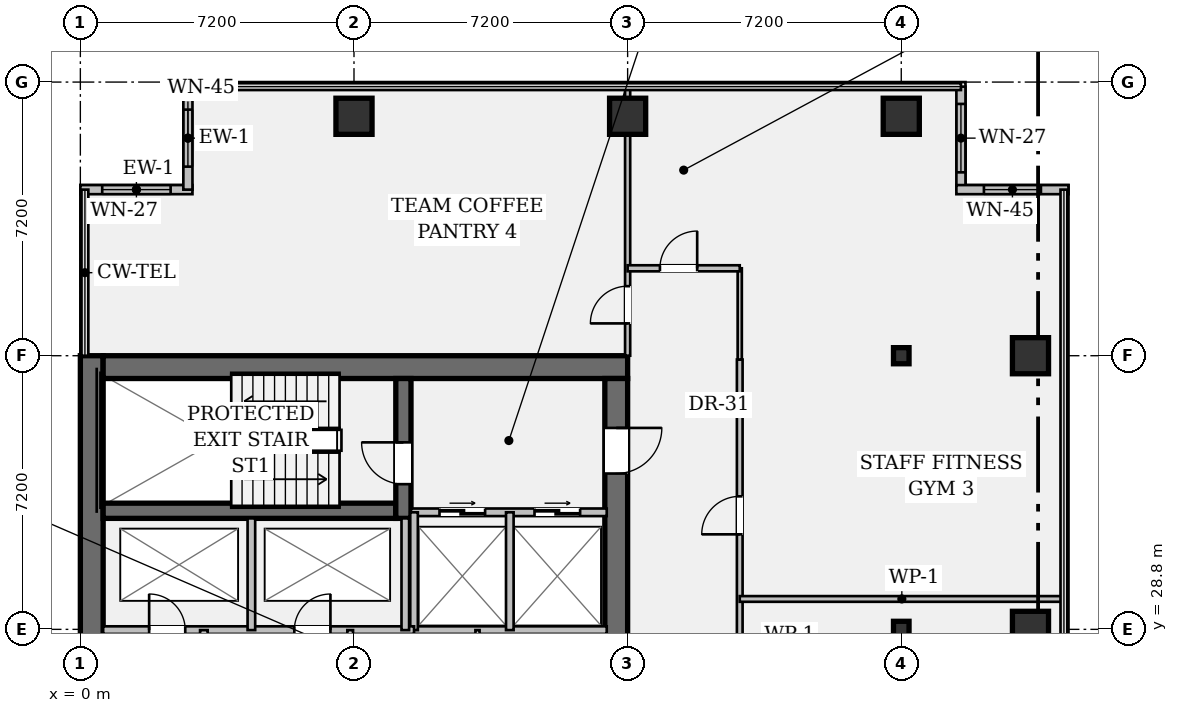
"""IFC4 building model, lengths in metres.
Left out: names, types, materials, properties, quantities, classifications, styles, units other than length and angle.
Written with IfcOpenShell. Run it as: python <this file> out.ifc"""

import sys

from ifc_helpers import new_model, si_unit, direction, frame, frame_2d, origin, origin_2d, place, context, subcontext, project, spatial, rectangle, hollow_rectangle, i_section, extrude, element, fill, save


model = new_model("IFC4")
c1 = context("Model", 3, precision=1e-05, world=origin(), true_north=direction((0.0, 1.0)))
c2 = subcontext(c1, "Body", "Model", "MODEL_VIEW")
j1 = project(units=[si_unit("LENGTHUNIT", "METRE"), si_unit("PLANEANGLEUNIT", "RADIAN")], contexts=[c1])
p1 = place(None, origin())
s1 = spatial("IfcSite", under=j1, at=p1, CompositionType="ELEMENT")
p2 = place(p1, origin())
s2 = spatial("IfcBuilding", under=s1, at=p2, CompositionType="ELEMENT")
p3 = place(p2, frame((0.0, 0.0, 113.75)))
s3 = spatial("IfcBuildingStorey", under=s2, at=p3, CompositionType="ELEMENT", Elevation=113.75)
p4 = place(p3, frame((0.3, 7.2, 0.0), z_axis=(0.0, 0.0, 1.0), x_axis=(0.0, 1.0, 0.0)))
e1 = element("IfcWall", 1, at=p4, inside=s3, PredefinedType="SHEAR", context=c2, shape_type="SweptSolid", body=[
    extrude(rectangle(XDim=28.8, YDim=0.6, at=frame_2d((14.4, 0.0))), origin(), (0.0, 0.0, 1.0), 3.58),
])
p5 = place(p3, frame((0.6, 35.7, 0.0), z_axis=(0.0, 0.0, 1.0), x_axis=(1.0, 0.0, 0.0)))
e2 = element("IfcWall", 2, at=p5, inside=s3, PredefinedType="SHEAR", context=c2, shape_type="SweptSolid", body=[
    extrude(rectangle(XDim=13.8, YDim=0.6, at=frame_2d((6.9, 0.0))), origin(), (0.0, 0.0, 1.0), 3.58),
])
p6 = place(p3, frame((14.1, 35.4, 0.0), z_axis=(0.0, 0.0, 1.0), x_axis=(0.0, -1.0, 0.0)))
e3 = element("IfcWall", 3, at=p6, inside=s3, PredefinedType="SHEAR", context=c2, shape_type="SweptSolid", body=[
    extrude(rectangle(XDim=27.6, YDim=0.6, at=frame_2d((13.8, 0.0))), origin(), (0.0, 0.0, 1.0), 3.58),
])
p7 = place(p6, frame((1.3, 0.0, 0.0)))
e4 = element("IfcOpeningElement", 4, at=p7, cuts=e3, PredefinedType="OPENING", context=c2, shape_type="SweptSolid", body=[
    extrude(rectangle(XDim=1.2, YDim=2.15, at=frame_2d((0.6, 1.075))), frame((0.0, 0.312, 0.0), z_axis=(0.0, -1.0, 0.0), x_axis=(1.0, 0.0, 0.0)), (0.0, 0.0, 1.0), 0.624),
])
p8 = place(p6, frame((25.25, 0.0, 0.0)))
e5 = element("IfcOpeningElement", 5, at=p8, cuts=e3, PredefinedType="OPENING", context=c2, shape_type="SweptSolid", body=[
    extrude(rectangle(XDim=1.2, YDim=2.15, at=frame_2d((0.6, 1.075))), frame((0.0, 0.312, 0.0), z_axis=(0.0, -1.0, 0.0), x_axis=(1.0, 0.0, 0.0)), (0.0, 0.0, 1.0), 0.624),
])
p9 = place(p6, frame((14.6, 0.0, 0.0)))
e6 = element("IfcOpeningElement", 6, at=p9, cuts=e3, PredefinedType="OPENING", context=c2, shape_type="SweptSolid", body=[
    extrude(rectangle(XDim=1.6, YDim=2.2, at=frame_2d((0.8, 1.1))), frame((0.0, 0.312, 0.0), z_axis=(0.0, -1.0, 0.0), x_axis=(1.0, 0.0, 0.0)), (0.0, 0.0, 1.0), 0.624),
])
p10 = place(p3, frame((0.6, 31.92, 0.0), z_axis=(0.0, 0.0, 1.0), x_axis=(1.0, 0.0, 0.0)))
e7 = element("IfcWall", 7, at=p10, inside=s3, PredefinedType="SHEAR", context=c2, shape_type="SweptSolid", body=[
    extrude(rectangle(XDim=7.7, YDim=0.4, at=frame_2d((3.85, 0.0))), origin(), (0.0, 0.0, 1.0), 3.58),
])
p11 = place(p3, frame((8.5, 31.72, 0.0), z_axis=(0.0, 0.0, 1.0), x_axis=(0.0, 1.0, 0.0)))
e8 = element("IfcWall", 8, at=p11, inside=s3, PredefinedType="SHEAR", context=c2, shape_type="SweptSolid", body=[
    extrude(rectangle(XDim=3.68, YDim=0.4, at=frame_2d((1.84, 0.0))), origin(), (0.0, 0.0, 1.0), 3.58),
])
p12 = place(p11, frame((0.9, 0.0, 0.0)))
e9 = element("IfcOpeningElement", 9, at=p12, cuts=e8, PredefinedType="OPENING", context=c2, shape_type="SweptSolid", body=[
    extrude(rectangle(XDim=1.1, YDim=2.15, at=frame_2d((0.55, 1.075))), frame((0.0, 0.212, 0.0), z_axis=(0.0, -1.0, 0.0), x_axis=(1.0, 0.0, 0.0)), (0.0, 0.0, 1.0), 0.424),
])
for number, where, z_axis, x_axis in (
    (10, (7.2, 42.3, 0.0), (0.0, 0.0, 1.0), (1.0, 0.0, 0.0)),
    (11, (14.4, 42.3, 0.0), (0.0, 0.0, 1.0), (1.0, 0.0, 0.0)),
):
    element("IfcColumn", number, at=place(p3, frame(where, z_axis=z_axis, x_axis=x_axis)), inside=s3, PredefinedType="COLUMN", context=c2, shape_type="SweptSolid", body=[
        extrude(hollow_rectangle(XDim=0.95, YDim=0.95, WallThickness=0.06, at=origin_2d()), origin(), (0.0, 0.0, 1.0), 3.58),
    ])
for number, where, z_axis, x_axis in (
    (12, (21.6, 28.8, 0.0), (0.0, 0.0, 1.0), (1.0, 0.0, 0.0)),
    (13, (21.6, 36.0, 0.0), (0.0, 0.0, 1.0), (1.0, 0.0, 0.0)),
):
    element("IfcColumn", number, at=place(p3, frame(where, z_axis=z_axis, x_axis=x_axis)), inside=s3, PredefinedType="COLUMN", context=c2, shape_type="SweptSolid", body=[
        extrude(i_section(OverallWidth=0.409, OverallDepth=0.424, WebThickness=0.033, FlangeThickness=0.052, FilletRadius=0.018, at=origin_2d()), origin(), (0.0, 0.0, 1.0), 3.58),
    ])
for number, where, z_axis, x_axis in (
    (14, (21.6, 42.3, 0.0), (0.0, 0.0, 1.0), (1.0, 0.0, 0.0)),
    (15, (25.0, 28.8, 0.0), (0.0, 0.0, 1.0), (1.0, 0.0, 0.0)),
    (16, (25.0, 36.0, 0.0), (0.0, 0.0, 1.0), (1.0, 0.0, 0.0)),
):
    element("IfcColumn", number, at=place(p3, frame(where, z_axis=z_axis, x_axis=x_axis)), inside=s3, PredefinedType="COLUMN", context=c2, shape_type="SweptSolid", body=[
        extrude(hollow_rectangle(XDim=0.95, YDim=0.95, WallThickness=0.06, at=origin_2d()), origin(), (0.0, 0.0, 1.0), 3.58),
    ])
p13 = place(p3, frame((0.0, 40.37, 0.0), z_axis=(0.0, 0.0, 1.0), x_axis=(1.0, 0.0, 0.0)))
e17 = element("IfcWall", 17, at=p13, inside=s3, PredefinedType="STANDARD", context=c2, shape_type="SweptSolid", body=[
    extrude(rectangle(XDim=2.95, YDim=0.24, at=frame_2d((1.475, 0.0))), origin(), (0.0, 0.0, 1.0), 3.58),
])
p14 = place(p13, frame((0.575, 0.0, 0.95)))
e18 = element("IfcOpeningElement", 18, at=p14, cuts=e17, PredefinedType="OPENING", context=c2, shape_type="SweptSolid", body=[
    extrude(rectangle(XDim=1.8, YDim=1.35, at=frame_2d((0.9, 0.675))), frame((0.0, 0.132, 0.0), z_axis=(0.0, -1.0, 0.0), x_axis=(1.0, 0.0, 0.0)), (0.0, 0.0, 1.0), 0.264),
])
p15 = place(p3, frame((2.83, 40.37, 0.0), z_axis=(0.0, 0.0, 1.0), x_axis=(0.0, 1.0, 0.0)))
e19 = element("IfcWall", 19, at=p15, inside=s3, PredefinedType="STANDARD", context=c2, shape_type="SweptSolid", body=[
    extrude(rectangle(XDim=2.71, YDim=0.24, at=frame_2d((1.355, 0.0))), origin(), (0.0, 0.0, 1.0), 3.58),
])
p16 = place(p15, frame((0.605, 0.0, 0.95)))
e20 = element("IfcOpeningElement", 20, at=p16, cuts=e19, PredefinedType="OPENING", context=c2, shape_type="SweptSolid", body=[
    extrude(rectangle(XDim=1.5, YDim=1.8, at=frame_2d((0.75, 0.9))), frame((0.0, 0.132, 0.0), z_axis=(0.0, -1.0, 0.0), x_axis=(1.0, 0.0, 0.0)), (0.0, 0.0, 1.0), 0.264),
])
p17 = place(p3, frame((23.17, 43.08, 0.0), z_axis=(0.0, 0.0, 1.0), x_axis=(0.0, -1.0, 0.0)))
e21 = element("IfcWall", 21, at=p17, inside=s3, PredefinedType="STANDARD", context=c2, shape_type="SweptSolid", body=[
    extrude(rectangle(XDim=2.71, YDim=0.24, at=frame_2d((1.355, 0.0))), origin(), (0.0, 0.0, 1.0), 3.58),
])
p18 = place(p17, frame((0.455, 0.0, 0.95)))
e22 = element("IfcOpeningElement", 22, at=p18, cuts=e21, PredefinedType="OPENING", context=c2, shape_type="SweptSolid", body=[
    extrude(rectangle(XDim=1.8, YDim=1.35, at=frame_2d((0.9, 0.675))), frame((0.0, 0.132, 0.0), z_axis=(0.0, -1.0, 0.0), x_axis=(1.0, 0.0, 0.0)), (0.0, 0.0, 1.0), 0.264),
])
p19 = place(p3, frame((23.05, 40.37, 0.0), z_axis=(0.0, 0.0, 1.0), x_axis=(1.0, 0.0, 0.0)))
e23 = element("IfcWall", 23, at=p19, inside=s3, PredefinedType="STANDARD", context=c2, shape_type="SweptSolid", body=[
    extrude(rectangle(XDim=2.95, YDim=0.24, at=frame_2d((1.475, 0.0))), origin(), (0.0, 0.0, 1.0), 3.58),
])
p20 = place(p19, frame((0.725, 0.0, 0.95)))
e24 = element("IfcOpeningElement", 24, at=p20, cuts=e23, PredefinedType="OPENING", context=c2, shape_type="SweptSolid", body=[
    extrude(rectangle(XDim=1.5, YDim=1.8, at=frame_2d((0.75, 0.9))), frame((0.0, 0.132, 0.0), z_axis=(0.0, -1.0, 0.0), x_axis=(1.0, 0.0, 0.0)), (0.0, 0.0, 1.0), 0.264),
])
p21 = place(p3, frame((8.7, 31.88, 0.0), z_axis=(0.0, 0.0, 1.0), x_axis=(1.0, 0.0, 0.0)))
e25 = element("IfcWall", 25, at=p21, inside=s3, PredefinedType="PARTITIONING", context=c2, shape_type="SweptSolid", body=[
    extrude(rectangle(XDim=5.15, YDim=0.2, at=frame_2d((2.575, 0.0))), origin(), (0.0, 0.0, 1.0), 3.58),
])
p22 = place(p21, frame((0.75, 0.0, 0.0)))
e26 = element("IfcOpeningElement", 26, at=p22, cuts=e25, PredefinedType="OPENING", context=c2, shape_type="SweptSolid", body=[
    extrude(rectangle(XDim=1.2, YDim=2.2, at=frame_2d((0.6, 1.1))), frame((0.0, 0.112, 0.0), z_axis=(0.0, -1.0, 0.0), x_axis=(1.0, 0.0, 0.0)), (0.0, 0.0, 1.0), 0.224),
])
p23 = place(p21, frame((3.25, 0.0, 0.0)))
e27 = element("IfcOpeningElement", 27, at=p23, cuts=e25, PredefinedType="OPENING", context=c2, shape_type="SweptSolid", body=[
    extrude(rectangle(XDim=1.2, YDim=2.2, at=frame_2d((0.6, 1.1))), frame((0.0, 0.112, 0.0), z_axis=(0.0, -1.0, 0.0), x_axis=(1.0, 0.0, 0.0)), (0.0, 0.0, 1.0), 0.224),
])
p24 = place(p3, frame((8.7, 28.78, 0.0), z_axis=(0.0, 0.0, 1.0), x_axis=(1.0, 0.0, 0.0)))
e28 = element("IfcWall", 28, at=p24, inside=s3, PredefinedType="PARTITIONING", context=c2, shape_type="SweptSolid", body=[
    extrude(rectangle(XDim=5.15, YDim=0.2, at=frame_2d((2.575, 0.0))), origin(), (0.0, 0.0, 1.0), 3.58),
])
for number, where, z_axis, x_axis in (
    (29, (8.78, 28.78, 0.0), (0.0, 0.0, 1.0), (0.0, 1.0, 0.0)),
    (30, (11.3, 28.78, 0.0), (0.0, 0.0, 1.0), (0.0, 1.0, 0.0)),
):
    element("IfcWall", number, at=place(p3, frame(where, z_axis=z_axis, x_axis=x_axis)), inside=s3, PredefinedType="PARTITIONING", context=c2, shape_type="SweptSolid", body=[
        extrude(rectangle(XDim=3.1, YDim=0.2, at=frame_2d((1.55, 0.0))), origin(), (0.0, 0.0, 1.0), 3.58),
    ])
p25 = place(p3, frame((0.6, 28.78, 0.0), z_axis=(0.0, 0.0, 1.0), x_axis=(1.0, 0.0, 0.0)))
e31 = element("IfcWall", 31, at=p25, inside=s3, PredefinedType="PARTITIONING", context=c2, shape_type="SweptSolid", body=[
    extrude(rectangle(XDim=8.18, YDim=0.2, at=frame_2d((4.09, 0.0))), origin(), (0.0, 0.0, 1.0), 3.58),
])
p26 = place(p25, frame((1.21, 0.0, 0.0)))
e32 = element("IfcOpeningElement", 32, at=p26, cuts=e31, PredefinedType="OPENING", context=c2, shape_type="SweptSolid", body=[
    extrude(rectangle(XDim=0.95, YDim=2.15, at=frame_2d((0.475, 1.075))), frame((0.0, 0.112, 0.0), z_axis=(0.0, -1.0, 0.0), x_axis=(1.0, 0.0, 0.0)), (0.0, 0.0, 1.0), 0.224),
])
p27 = place(p25, frame((5.03, 0.0, 0.0)))
e33 = element("IfcOpeningElement", 33, at=p27, cuts=e31, PredefinedType="OPENING", context=c2, shape_type="SweptSolid", body=[
    extrude(rectangle(XDim=0.95, YDim=2.15, at=frame_2d((0.475, 1.075))), frame((0.0, 0.112, 0.0), z_axis=(0.0, -1.0, 0.0), x_axis=(1.0, 0.0, 0.0)), (0.0, 0.0, 1.0), 0.224),
])
for number, where, z_axis, x_axis in (
    (34, (4.5, 28.78, 0.0), (0.0, 0.0, 1.0), (0.0, 1.0, 0.0)),
    (35, (8.55, 28.78, 0.0), (0.0, 0.0, 1.0), (0.0, 1.0, 0.0)),
):
    element("IfcWall", number, at=place(p3, frame(where, z_axis=z_axis, x_axis=x_axis)), inside=s3, PredefinedType="PARTITIONING", context=c2, shape_type="SweptSolid", body=[
        extrude(rectangle(XDim=2.94, YDim=0.2, at=frame_2d((1.47, 0.0))), origin(), (0.0, 0.0, 1.0), 3.58),
    ])
p28 = place(p3, frame((3.25, 15.7, 0.0), z_axis=(0.0, 0.0, 1.0), x_axis=(0.0, 1.0, 0.0)))
e36 = element("IfcWall", 36, at=p28, inside=s3, PredefinedType="PARTITIONING", context=c2, shape_type="SweptSolid", body=[
    extrude(rectangle(XDim=13.08, YDim=0.2, at=frame_2d((6.54, 0.0))), origin(), (0.0, 0.0, 1.0), 3.58),
])
p29 = place(p3, frame((7.1, 22.2, 0.0), z_axis=(0.0, 0.0, 1.0), x_axis=(0.0, 1.0, 0.0)))
e37 = element("IfcWall", 37, at=p29, inside=s3, PredefinedType="PARTITIONING", context=c2, shape_type="SweptSolid", body=[
    extrude(rectangle(XDim=6.58, YDim=0.15, at=frame_2d((3.29, 0.0))), origin(), (0.0, 0.0, 1.0), 3.58),
])
p30 = place(p3, frame((10.45, 22.2, 0.0), z_axis=(0.0, 0.0, 1.0), x_axis=(0.0, 1.0, 0.0)))
e38 = element("IfcWall", 38, at=p30, inside=s3, PredefinedType="PARTITIONING", context=c2, shape_type="SweptSolid", body=[
    extrude(rectangle(XDim=6.58, YDim=0.11, at=frame_2d((3.29, 0.0))), origin(), (0.0, 0.0, 1.0), 3.58),
])
p31 = place(p3, frame((17.35, 20.7, 0.0), z_axis=(0.0, 0.0, 1.0), x_axis=(0.0, 1.0, 0.0)))
e39 = element("IfcWall", 39, at=p31, inside=s3, PredefinedType="PARTITIONING", context=c2, shape_type="SweptSolid", body=[
    extrude(rectangle(XDim=15.2, YDim=0.15, at=frame_2d((7.6, 0.0))), origin(), (0.0, 0.0, 1.0), 2.869),
])
p32 = place(p31, frame((5.2, 0.0, 0.0)))
e40 = element("IfcOpeningElement", 40, at=p32, cuts=e39, PredefinedType="OPENING", context=c2, shape_type="SweptSolid", body=[
    extrude(rectangle(XDim=0.98, YDim=2.15, at=frame_2d((0.49, 1.075))), frame((0.0, 0.087, 0.0), z_axis=(0.0, -1.0, 0.0), x_axis=(1.0, 0.0, 0.0)), (0.0, 0.0, 1.0), 0.174),
])
p33 = place(p31, frame((10.6, 0.0, 0.0)))
e41 = element("IfcOpeningElement", 41, at=p33, cuts=e39, PredefinedType="OPENING", context=c2, shape_type="SweptSolid", body=[
    extrude(rectangle(XDim=1.0, YDim=2.15, at=frame_2d((0.5, 1.075))), frame((0.0, 0.087, 0.0), z_axis=(0.0, -1.0, 0.0), x_axis=(1.0, 0.0, 0.0)), (0.0, 0.0, 1.0), 0.174),
])
p34 = place(p3, frame((17.35, 29.6, 0.0), z_axis=(0.0, 0.0, 1.0), x_axis=(1.0, 0.0, 0.0)))
e42 = element("IfcWall", 42, at=p34, inside=s3, PredefinedType="PARTITIONING", context=c2, shape_type="SweptSolid", body=[
    extrude(rectangle(XDim=8.53, YDim=0.15, at=frame_2d((4.265, 0.0))), origin(), (0.0, 0.0, 1.0), 2.869),
])
p35 = place(p3, frame((14.4, 36.0, 0.0), z_axis=(0.0, 0.0, 1.0), x_axis=(0.0, 1.0, 0.0)))
e43 = element("IfcWall", 43, at=p35, inside=s3, PredefinedType="PARTITIONING", context=c2, shape_type="SweptSolid", body=[
    extrude(rectangle(XDim=7.08, YDim=0.135, at=frame_2d((3.54, 0.0))), origin(), (0.0, 0.0, 1.0), 2.869),
])
p36 = place(p35, frame((0.85, 0.0, 0.0)))
e44 = element("IfcOpeningElement", 44, at=p36, cuts=e43, PredefinedType="OPENING", context=c2, shape_type="SweptSolid", body=[
    extrude(rectangle(XDim=0.98, YDim=2.15, at=frame_2d((0.49, 1.075))), frame((0.0, 0.08, 0.0), z_axis=(0.0, -1.0, 0.0), x_axis=(1.0, 0.0, 0.0)), (0.0, 0.0, 1.0), 0.159),
])
p37 = place(p3, frame((17.35, 35.9, 0.0), z_axis=(0.0, 0.0, 1.0), x_axis=(0.0, 1.0, 0.0)))
e45 = element("IfcWall", 45, at=p37, inside=s3, PredefinedType="PARTITIONING", context=c2, shape_type="SweptSolid", body=[
    extrude(rectangle(XDim=2.4, YDim=0.11, at=frame_2d((1.2, 0.0))), origin(), (0.0, 0.0, 1.0), 2.869),
])
p38 = place(p3, frame((14.4, 38.3, 0.0), z_axis=(0.0, 0.0, 1.0), x_axis=(1.0, 0.0, 0.0)))
e46 = element("IfcWall", 46, at=p38, inside=s3, PredefinedType="PARTITIONING", context=c2, shape_type="SweptSolid", body=[
    extrude(rectangle(XDim=2.95, YDim=0.16, at=frame_2d((1.475, 0.0))), origin(), (0.0, 0.0, 1.0), 2.869),
])
p39 = place(p38, frame((0.85, 0.0, 0.0)))
e47 = element("IfcOpeningElement", 47, at=p39, cuts=e46, PredefinedType="OPENING", context=c2, shape_type="SweptSolid", body=[
    extrude(rectangle(XDim=0.98, YDim=2.15, at=frame_2d((0.49, 1.075))), frame((0.0, 0.092, 0.0), z_axis=(0.0, -1.0, 0.0), x_axis=(1.0, 0.0, 0.0)), (0.0, 0.0, 1.0), 0.184),
])
p40 = place(p14, origin())
e48 = element("IfcWindow", 48, at=p40, inside=s3, PartitioningType="SINGLE_PANEL", PredefinedType="WINDOW", context=c2, shape_type="SweptSolid", body=[
    extrude(rectangle(XDim=1.8, YDim=1.35, at=frame_2d((0.9, 0.675))), frame((0.0, 0.03, 0.0), z_axis=(0.0, -1.0, 0.0), x_axis=(1.0, 0.0, 0.0)), (0.0, 0.0, 1.0), 0.06),
])
fill(e18, e48)
p41 = place(p16, origin())
e49 = element("IfcWindow", 49, at=p41, inside=s3, PartitioningType="SINGLE_PANEL", PredefinedType="WINDOW", context=c2, shape_type="SweptSolid", body=[
    extrude(rectangle(XDim=1.5, YDim=1.8, at=frame_2d((0.75, 0.9))), frame((0.0, 0.03, 0.0), z_axis=(0.0, -1.0, 0.0), x_axis=(1.0, 0.0, 0.0)), (0.0, 0.0, 1.0), 0.06),
])
fill(e20, e49)
p42 = place(p18, origin())
e50 = element("IfcWindow", 50, at=p42, inside=s3, PartitioningType="SINGLE_PANEL", PredefinedType="WINDOW", context=c2, shape_type="SweptSolid", body=[
    extrude(rectangle(XDim=1.8, YDim=1.35, at=frame_2d((0.9, 0.675))), frame((0.0, 0.03, 0.0), z_axis=(0.0, -1.0, 0.0), x_axis=(1.0, 0.0, 0.0)), (0.0, 0.0, 1.0), 0.06),
])
fill(e22, e50)
p43 = place(p20, origin())
e51 = element("IfcWindow", 51, at=p43, inside=s3, PartitioningType="SINGLE_PANEL", PredefinedType="WINDOW", context=c2, shape_type="SweptSolid", body=[
    extrude(rectangle(XDim=1.5, YDim=1.8, at=frame_2d((0.75, 0.9))), frame((0.0, 0.03, 0.0), z_axis=(0.0, -1.0, 0.0), x_axis=(1.0, 0.0, 0.0)), (0.0, 0.0, 1.0), 0.06),
])
fill(e24, e51)
p44 = place(p12, origin())
e52 = element("IfcDoor", 52, at=p44, inside=s3, OperationType="SINGLE_SWING_RIGHT", PredefinedType="DOOR", context=c2, shape_type="SweptSolid", body=[
    extrude(rectangle(XDim=1.1, YDim=2.15, at=frame_2d((0.55, 1.075))), frame((0.0, 0.025, 0.0), z_axis=(0.0, -1.0, 0.0), x_axis=(1.0, 0.0, 0.0)), (0.0, 0.0, 1.0), 0.05),
])
fill(e9, e52)
p45 = place(p7, origin())
e53 = element("IfcDoor", 53, at=p45, inside=s3, OperationType="SINGLE_SWING_LEFT", PredefinedType="DOOR", context=c2, shape_type="SweptSolid", body=[
    extrude(rectangle(XDim=1.2, YDim=2.15, at=frame_2d((0.6, 1.075))), frame((0.0, 0.025, 0.0), z_axis=(0.0, -1.0, 0.0), x_axis=(1.0, 0.0, 0.0)), (0.0, 0.0, 1.0), 0.05),
])
fill(e4, e53)
p46 = place(p22, origin())
e54 = element("IfcDoor", 54, at=p46, inside=s3, OperationType="DOUBLE_DOOR_SLIDING", PredefinedType="DOOR", context=c2, shape_type="SweptSolid", body=[
    extrude(rectangle(XDim=1.2, YDim=2.2, at=frame_2d((0.6, 1.1))), frame((0.0, 0.025, 0.0), z_axis=(0.0, -1.0, 0.0), x_axis=(1.0, 0.0, 0.0)), (0.0, 0.0, 1.0), 0.05),
])
fill(e26, e54)
p47 = place(p23, origin())
e55 = element("IfcDoor", 55, at=p47, inside=s3, OperationType="DOUBLE_DOOR_SLIDING", PredefinedType="DOOR", context=c2, shape_type="SweptSolid", body=[
    extrude(rectangle(XDim=1.2, YDim=2.2, at=frame_2d((0.6, 1.1))), frame((0.0, 0.025, 0.0), z_axis=(0.0, -1.0, 0.0), x_axis=(1.0, 0.0, 0.0)), (0.0, 0.0, 1.0), 0.05),
])
fill(e27, e55)
p48 = place(p26, origin())
e56 = element("IfcDoor", 56, at=p48, inside=s3, OperationType="SINGLE_SWING_LEFT", PredefinedType="DOOR", context=c2, shape_type="SweptSolid", body=[
    extrude(rectangle(XDim=0.95, YDim=2.15, at=frame_2d((0.475, 1.075))), frame((0.0, 0.025, 0.0), z_axis=(0.0, -1.0, 0.0), x_axis=(1.0, 0.0, 0.0)), (0.0, 0.0, 1.0), 0.05),
])
fill(e32, e56)
p49 = place(p27, origin())
e57 = element("IfcDoor", 57, at=p49, inside=s3, OperationType="SINGLE_SWING_RIGHT", PredefinedType="DOOR", context=c2, shape_type="SweptSolid", body=[
    extrude(rectangle(XDim=0.95, YDim=2.15, at=frame_2d((0.475, 1.075))), frame((0.0, 0.025, 0.0), z_axis=(0.0, -1.0, 0.0), x_axis=(1.0, 0.0, 0.0)), (0.0, 0.0, 1.0), 0.05),
])
fill(e33, e57)
p50 = place(p33, origin())
e58 = element("IfcDoor", 58, at=p50, inside=s3, OperationType="SINGLE_SWING_LEFT", PredefinedType="DOOR", context=c2, shape_type="SweptSolid", body=[
    extrude(rectangle(XDim=1.0, YDim=2.15, at=frame_2d((0.5, 1.075))), frame((0.0, 0.025, 0.0), z_axis=(0.0, -1.0, 0.0), x_axis=(1.0, 0.0, 0.0)), (0.0, 0.0, 1.0), 0.05),
])
fill(e41, e58)
p51 = place(p36, origin())
e59 = element("IfcDoor", 59, at=p51, inside=s3, OperationType="SINGLE_SWING_LEFT", PredefinedType="DOOR", context=c2, shape_type="SweptSolid", body=[
    extrude(rectangle(XDim=0.98, YDim=2.15, at=frame_2d((0.49, 1.075))), frame((0.0, 0.025, 0.0), z_axis=(0.0, -1.0, 0.0), x_axis=(1.0, 0.0, 0.0)), (0.0, 0.0, 1.0), 0.05),
])
fill(e44, e59)
p52 = place(p39, origin())
e60 = element("IfcDoor", 60, at=p52, inside=s3, OperationType="SINGLE_SWING_RIGHT", PredefinedType="DOOR", context=c2, shape_type="SweptSolid", body=[
    extrude(rectangle(XDim=0.98, YDim=2.15, at=frame_2d((0.49, 1.075))), frame((0.0, 0.025, 0.0), z_axis=(0.0, -1.0, 0.0), x_axis=(1.0, 0.0, 0.0)), (0.0, 0.0, 1.0), 0.05),
])
fill(e47, e60)
save(model, sys.argv[1])
